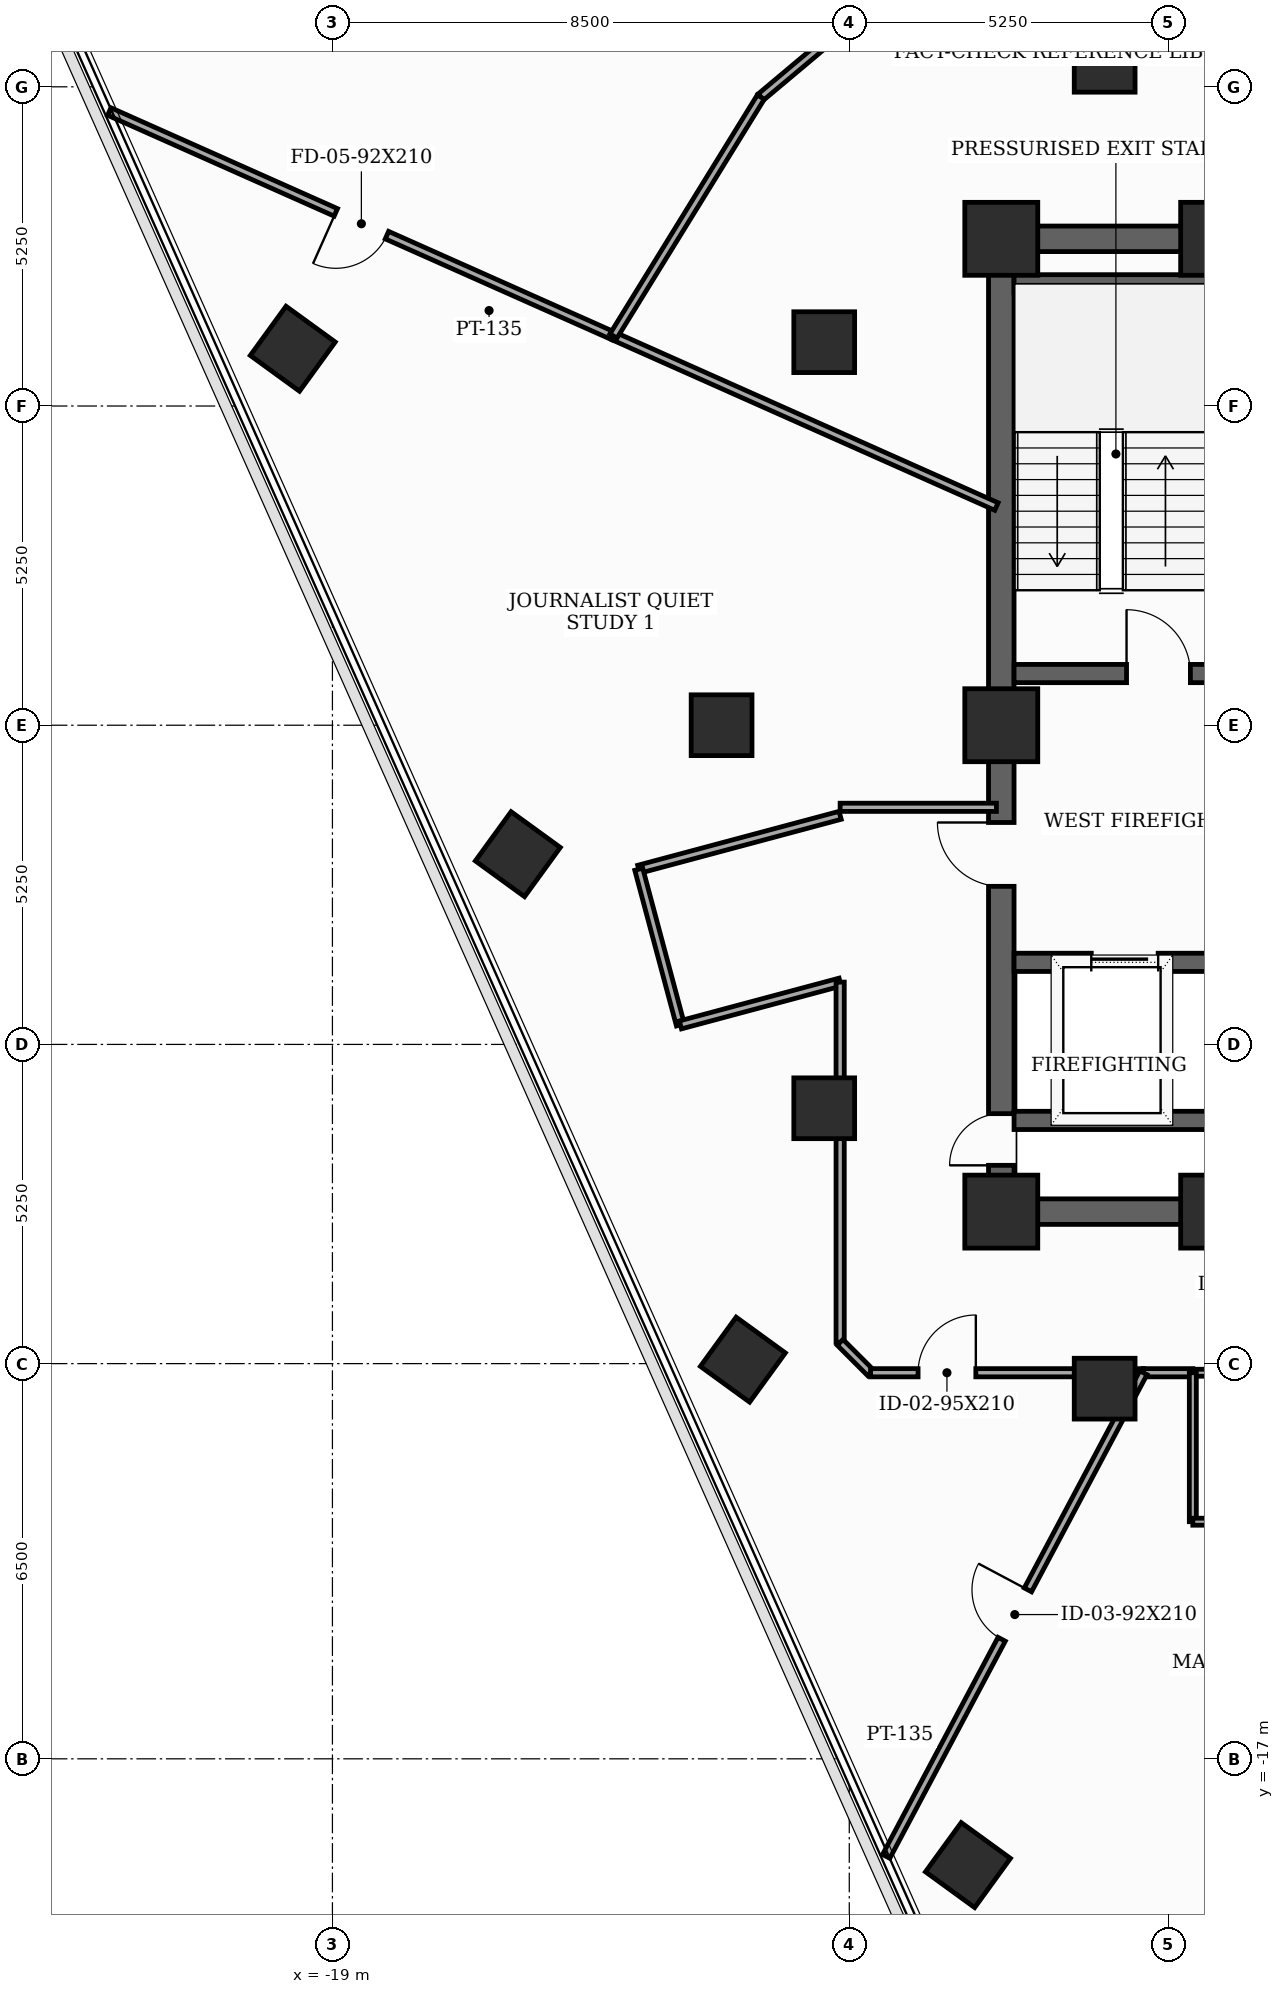
"""IFC4 building model, lengths in metres.
Left out: names, types, materials, properties, quantities, classifications, styles, units other than length and angle.
Written with IfcOpenShell. Run it as: python <this file> out.ifc"""

import sys

from ifc_helpers import new_model, si_unit, direction, frame, frame_2d, origin, origin_2d, place, context, subcontext, project, spatial, rectangle, extrude, element, fill, save


model = new_model("IFC4")
c1 = context("Model", 3, precision=1e-05, world=origin(), true_north=direction((0.0, 1.0)))
c2 = subcontext(c1, "Body", "Model", "MODEL_VIEW")
j1 = project(units=[si_unit("LENGTHUNIT", "METRE"), si_unit("PLANEANGLEUNIT", "RADIAN")], contexts=[c1])
p1 = place(None, origin())
s1 = spatial("IfcSite", under=j1, at=p1, CompositionType="ELEMENT")
p2 = place(p1, origin())
s2 = spatial("IfcBuilding", under=s1, at=p2, CompositionType="ELEMENT")
p3 = place(p2, frame((0.0, 0.0, 237.4)))
s3 = spatial("IfcBuildingStorey", under=s2, at=p3, CompositionType="ELEMENT", Elevation=237.4)
for number, where, z_axis, x_axis in (
    (1, (-8.0, -8.0, 0.0), (0.0, 0.0, 1.0), (1.0, 0.0, 0.0)),
    (2, (-4.45, -8.0, 0.0), (0.0, 0.0, 1.0), (1.0, 0.0, 0.0)),
    (3, (-4.45, 8.0, 0.0), (0.0, 0.0, 1.0), (1.0, 0.0, 0.0)),
    (4, (-8.0, 8.0, 0.0), (0.0, 0.0, 1.0), (1.0, 0.0, 0.0)),
    (5, (-8.0, 0.0, 0.0), (0.0, 0.0, 1.0), (1.0, 0.0, 0.0)),
):
    element("IfcColumn", number, at=place(p3, frame(where, z_axis=z_axis, x_axis=x_axis)), inside=s3, PredefinedType="COLUMN", context=c2, shape_type="SweptSolid", body=[
        extrude(rectangle(XDim=1.2, YDim=1.2, at=origin_2d()), origin(), (0.0, 0.0, 1.0), 3.7),
    ])
for number, where, z_axis, x_axis in (
    (6, (-6.3, 10.912, 0.0), (0.0, 0.0, 1.0), (1.0, 0.0, 0.0)),
    (7, (-10.912, 6.3, 0.0), (0.0, 0.0, 1.0), (1.0, 0.0, 0.0)),
    (8, (-12.6, 0.0, 0.0), (0.0, 0.0, 1.0), (1.0, 0.0, 0.0)),
    (9, (-10.912, -6.3, 0.0), (0.0, 0.0, 1.0), (1.0, 0.0, 0.0)),
    (10, (-6.3, -10.912, 0.0), (0.0, 0.0, 1.0), (1.0, 0.0, 0.0)),
    (11, (-19.652, 6.192, 0.0), (0.0, 0.0, 1.0), (0.588, 0.809, 0.0)),
    (12, (-15.951, -2.121, 0.0), (0.0, 0.0, 1.0), (0.588, 0.809, 0.0)),
    (13, (-12.25, -10.435, 0.0), (0.0, 0.0, 1.0), (0.588, 0.809, 0.0)),
    (14, (-8.548, -18.748, 0.0), (0.0, 0.0, 1.0), (0.588, 0.809, 0.0)),
):
    element("IfcColumn", number, at=place(p3, frame(where, z_axis=z_axis, x_axis=x_axis)), inside=s3, PredefinedType="COLUMN", context=c2, shape_type="SweptSolid", body=[
        extrude(rectangle(XDim=1.0, YDim=1.0, at=origin_2d()), origin(), (0.0, 0.0, 1.0), 3.7),
    ])
p4 = place(p3, frame((-8.0, -8.0, 0.0), z_axis=(0.0, 0.0, 1.0), x_axis=(0.0, 1.0, 0.0)))
e15 = element("IfcWall", 15, at=p4, inside=s3, PredefinedType="SHEAR", context=c2, shape_type="SweptSolid", body=[
    extrude(rectangle(XDim=16.0, YDim=0.42, at=frame_2d((8.0, 0.0))), origin(), (0.0, 0.0, 1.0), 3.5),
])
p5 = place(p4, frame((0.761, 0.0, 0.0)))
e16 = element("IfcOpeningElement", 16, at=p5, cuts=e15, PredefinedType="OPENING", context=c2, shape_type="SweptSolid", body=[
    extrude(rectangle(XDim=0.85, YDim=2.02, at=frame_2d((0.425, 1.01))), frame((0.0, 0.22, 0.0), z_axis=(0.0, -1.0, 0.0), x_axis=(1.0, 0.0, 0.0)), (0.0, 0.0, 1.0), 0.44),
])
p6 = place(p4, frame((5.35, 0.0, 0.0)))
e17 = element("IfcOpeningElement", 17, at=p6, cuts=e15, PredefinedType="OPENING", context=c2, shape_type="SweptSolid", body=[
    extrude(rectangle(XDim=1.05, YDim=2.15, at=frame_2d((0.525, 1.075))), frame((0.0, 0.22, 0.0), z_axis=(0.0, -1.0, 0.0), x_axis=(1.0, 0.0, 0.0)), (0.0, 0.0, 1.0), 0.44),
])
p7 = place(p3, frame((-8.0, -8.0, 0.0), z_axis=(0.0, 0.0, 1.0), x_axis=(1.0, 0.0, 0.0)))
e18 = element("IfcWall", 18, at=p7, inside=s3, PredefinedType="SHEAR", context=c2, shape_type="SweptSolid", body=[
    extrude(rectangle(XDim=16.0, YDim=0.42, at=frame_2d((8.0, 0.0))), origin(), (0.0, 0.0, 1.0), 3.5),
])
p8 = place(p7, frame((4.6, 0.0, 0.0)))
e19 = element("IfcOpeningElement", 19, at=p8, cuts=e18, PredefinedType="OPENING", context=c2, shape_type="SweptSolid", body=[
    extrude(rectangle(XDim=0.95, YDim=2.1, at=frame_2d((0.475, 1.05))), frame((0.0, 0.22, 0.0), z_axis=(0.0, -1.0, 0.0), x_axis=(1.0, 0.0, 0.0)), (0.0, 0.0, 1.0), 0.44),
])
p9 = place(p7, frame((7.52, 0.0, 0.0)))
e20 = element("IfcOpeningElement", 20, at=p9, cuts=e18, PredefinedType="OPENING", context=c2, shape_type="SweptSolid", body=[
    extrude(rectangle(XDim=0.95, YDim=2.1, at=frame_2d((0.475, 1.05))), frame((0.0, 0.22, 0.0), z_axis=(0.0, -1.0, 0.0), x_axis=(1.0, 0.0, 0.0)), (0.0, 0.0, 1.0), 0.44),
])
p10 = place(p7, frame((10.45, 0.0, 0.0)))
e21 = element("IfcOpeningElement", 21, at=p10, cuts=e18, PredefinedType="OPENING", context=c2, shape_type="SweptSolid", body=[
    extrude(rectangle(XDim=0.95, YDim=2.1, at=frame_2d((0.475, 1.05))), frame((0.0, 0.22, 0.0), z_axis=(0.0, -1.0, 0.0), x_axis=(1.0, 0.0, 0.0)), (0.0, 0.0, 1.0), 0.44),
])
p11 = place(p3, frame((-8.0, 8.0, 0.0), z_axis=(0.0, 0.0, 1.0), x_axis=(1.0, 0.0, 0.0)))
e22 = element("IfcWall", 22, at=p11, inside=s3, PredefinedType="SHEAR", context=c2, shape_type="SweptSolid", body=[
    extrude(rectangle(XDim=16.0, YDim=0.42, at=frame_2d((8.0, 0.0))), origin(), (0.0, 0.0, 1.0), 3.5),
])
p12 = place(p11, frame((7.1, 0.0, 0.0)))
e23 = element("IfcOpeningElement", 23, at=p12, cuts=e22, PredefinedType="OPENING", context=c2, shape_type="SweptSolid", body=[
    extrude(rectangle(XDim=1.8, YDim=2.15, at=frame_2d((0.9, 1.075))), frame((0.0, 0.22, 0.0), z_axis=(0.0, -1.0, 0.0), x_axis=(1.0, 0.0, 0.0)), (0.0, 0.0, 1.0), 0.44),
])
p13 = place(p3, frame((-7.79, 0.85, 0.0), z_axis=(0.0, 0.0, 1.0), x_axis=(1.0, 0.0, 0.0)))
e24 = element("IfcWall", 24, at=p13, inside=s3, PredefinedType="SHEAR", context=c2, shape_type="SweptSolid", body=[
    extrude(rectangle(XDim=3.34, YDim=0.3, at=frame_2d((1.67, 0.0))), origin(), (0.0, 0.0, 1.0), 3.5),
])
p14 = place(p13, frame((1.85, 0.0, 0.0)))
e25 = element("IfcOpeningElement", 25, at=p14, cuts=e24, PredefinedType="OPENING", context=c2, shape_type="SweptSolid", body=[
    extrude(rectangle(XDim=1.05, YDim=2.15, at=frame_2d((0.525, 1.075))), frame((0.0, 0.16, 0.0), z_axis=(0.0, -1.0, 0.0), x_axis=(1.0, 0.0, 0.0)), (0.0, 0.0, 1.0), 0.32),
])
p15 = place(p3, frame((-7.79, 7.26, 0.0), z_axis=(0.0, 0.0, 1.0), x_axis=(1.0, 0.0, 0.0)))
e26 = element("IfcWall", 26, at=p15, inside=s3, PredefinedType="SHEAR", context=c2, shape_type="SweptSolid", body=[
    extrude(rectangle(XDim=3.34, YDim=0.3, at=frame_2d((1.67, 0.0))), origin(), (0.0, 0.0, 1.0), 3.5),
])
p16 = place(p3, frame((-7.79, -3.9, 0.0), z_axis=(0.0, 0.0, 1.0), x_axis=(1.0, 0.0, 0.0)))
e27 = element("IfcWall", 27, at=p16, inside=s3, PredefinedType="SHEAR", context=c2, shape_type="SweptSolid", body=[
    extrude(rectangle(XDim=3.34, YDim=0.3, at=frame_2d((1.67, 0.0))), origin(), (0.0, 0.0, 1.0), 3.5),
])
p17 = place(p16, frame((1.27, 0.0, 0.0)))
e28 = element("IfcOpeningElement", 28, at=p17, cuts=e27, PredefinedType="OPENING", context=c2, shape_type="SweptSolid", body=[
    extrude(rectangle(XDim=1.1, YDim=2.1, at=frame_2d((0.55, 1.05))), frame((0.0, 0.16, 0.0), z_axis=(0.0, -1.0, 0.0), x_axis=(1.0, 0.0, 0.0)), (0.0, 0.0, 1.0), 0.32),
])
p18 = place(p3, frame((-7.79, -6.5, 0.0), z_axis=(0.0, 0.0, 1.0), x_axis=(1.0, 0.0, 0.0)))
e29 = element("IfcWall", 29, at=p18, inside=s3, PredefinedType="SHEAR", context=c2, shape_type="SweptSolid", body=[
    extrude(rectangle(XDim=3.34, YDim=0.3, at=frame_2d((1.67, 0.0))), origin(), (0.0, 0.0, 1.0), 3.5),
])
p19 = place(p3, frame((-8.08, -1.35, 0.0), z_axis=(0.0, 0.0, 1.0), x_axis=(-1.0, 0.0, 0.0)))
e30 = element("IfcWall", 30, at=p19, inside=s3, PredefinedType="PARTITIONING", context=c2, shape_type="SweptSolid", body=[
    extrude(rectangle(XDim=2.57, YDim=0.135, at=frame_2d((1.285, 0.0))), origin(), (0.0, 0.0, 1.0), 2.885),
])
p20 = place(p3, frame((-10.65, -1.482, 0.0), z_axis=(0.0, 0.0, 1.0), x_axis=(-0.965961397105, -0.2586862565, 0.0)))
e31 = element("IfcWall", 31, at=p20, inside=s3, PredefinedType="PARTITIONING", context=c2, shape_type="SweptSolid", body=[
    extrude(rectangle(XDim=3.429, YDim=0.135, at=frame_2d((1.714, 0.0))), origin(), (0.0, 0.0, 1.0), 2.885),
])
p21 = place(p3, frame((-13.962, -2.369, 0.0), z_axis=(0.0, 0.0, 1.0), x_axis=(0.258413725385, -0.966034340245, 0.0)))
e32 = element("IfcWall", 32, at=p21, inside=s3, PredefinedType="PARTITIONING", context=c2, shape_type="SweptSolid", body=[
    extrude(rectangle(XDim=2.65, YDim=0.135, at=frame_2d((1.325, 0.0))), origin(), (0.0, 0.0, 1.0), 3.5),
])
p22 = place(p3, frame((-13.277, -4.929, 0.0), z_axis=(0.0, 0.0, 1.0), x_axis=(0.965934830229, 0.258785439601, 0.0)))
e33 = element("IfcWall", 33, at=p22, inside=s3, PredefinedType="PARTITIONING", context=c2, shape_type="SweptSolid", body=[
    extrude(rectangle(XDim=2.72, YDim=0.135, at=frame_2d((1.36, 0.0))), origin(), (0.0, 0.0, 1.0), 2.885),
])
p23 = place(p3, frame((-10.65, -4.225, 0.0), z_axis=(0.0, 0.0, 1.0), x_axis=(0.0, -1.0, 0.0)))
e34 = element("IfcWall", 34, at=p23, inside=s3, PredefinedType="PARTITIONING", context=c2, shape_type="SweptSolid", body=[
    extrude(rectangle(XDim=5.925, YDim=0.135, at=frame_2d((2.962, 0.0))), origin(), (0.0, 0.0, 1.0), 2.885),
])
p24 = place(p3, frame((-10.65, -10.15, 0.0), z_axis=(0.0, 0.0, 1.0), x_axis=(0.707106781187, -0.707106781187, 0.0)))
e35 = element("IfcWall", 35, at=p24, inside=s3, PredefinedType="PARTITIONING", context=c2, shape_type="SweptSolid", body=[
    extrude(rectangle(XDim=0.707, YDim=0.135, at=frame_2d((0.354, 0.0))), origin(), (0.0, 0.0, 1.0), 3.5),
])
p25 = place(p3, frame((-10.15, -10.65, 0.0), z_axis=(0.0, 0.0, 1.0), x_axis=(1.0, 0.0, 0.0)))
e36 = element("IfcWall", 36, at=p25, inside=s3, PredefinedType="PARTITIONING", context=c2, shape_type="SweptSolid", body=[
    extrude(rectangle(XDim=4.487, YDim=0.135, at=frame_2d((2.243, 0.0))), origin(), (0.0, 0.0, 1.0), 2.885),
])
p26 = place(p25, frame((0.781, 0.0, 0.0)))
e37 = element("IfcOpeningElement", 37, at=p26, cuts=e36, PredefinedType="OPENING", context=c2, shape_type="SweptSolid", body=[
    extrude(rectangle(XDim=0.95, YDim=2.1, at=frame_2d((0.475, 1.05))), frame((0.0, 0.077, 0.0), z_axis=(0.0, -1.0, 0.0), x_axis=(1.0, 0.0, 0.0)), (0.0, 0.0, 1.0), 0.155),
])
p27 = place(p3, frame((-4.85, -10.65, 0.0), z_axis=(0.0, 0.0, 1.0), x_axis=(1.0, 0.0, 0.0)))
e38 = element("IfcWall", 38, at=p27, inside=s3, PredefinedType="PARTITIONING", context=c2, shape_type="SweptSolid", body=[
    extrude(rectangle(XDim=2.4, YDim=0.115, at=frame_2d((1.2, 0.0))), origin(), (0.0, 0.0, 1.0), 3.5),
])
p28 = place(p27, frame((0.74, 0.0, 0.0)))
e39 = element("IfcOpeningElement", 39, at=p28, cuts=e38, PredefinedType="OPENING", context=c2, shape_type="SweptSolid", body=[
    extrude(rectangle(XDim=0.92, YDim=2.1, at=frame_2d((0.46, 1.05))), frame((0.0, 0.067, 0.0), z_axis=(0.0, -1.0, 0.0), x_axis=(1.0, 0.0, 0.0)), (0.0, 0.0, 1.0), 0.135),
])
p29 = place(p3, frame((-5.663, -10.65, 0.0), z_axis=(0.0, 0.0, 1.0), x_axis=(1.0, 0.0, 0.0)))
e40 = element("IfcWall", 40, at=p29, inside=s3, PredefinedType="PARTITIONING", context=c2, shape_type="SweptSolid", body=[
    extrude(rectangle(XDim=0.813, YDim=0.135, at=frame_2d((0.406, 0.0))), origin(), (0.0, 0.0, 1.0), 3.5),
])
p30 = place(p3, frame((-9.893, -18.605, 0.0), z_axis=(0.0, 0.0, 1.0), x_axis=(0.469478145305, 0.88294409284, 0.0)))
e41 = element("IfcWall", 41, at=p30, inside=s3, PredefinedType="PARTITIONING", context=c2, shape_type="SweptSolid", body=[
    extrude(rectangle(XDim=9.01, YDim=0.135, at=frame_2d((4.505, 0.0))), origin(), (0.0, 0.0, 1.0), 2.885),
])
p31 = place(p30, frame((4.045, 0.0, 0.0)))
e42 = element("IfcOpeningElement", 42, at=p31, cuts=e41, PredefinedType="OPENING", context=c2, shape_type="SweptSolid", body=[
    extrude(rectangle(XDim=0.92, YDim=2.1, at=frame_2d((0.46, 1.05))), frame((0.0, 0.077, 0.0), z_axis=(0.0, -1.0, 0.0), x_axis=(1.0, 0.0, 0.0)), (0.0, 0.0, 1.0), 0.155),
])
p32 = place(p3, frame((-8.08, 3.597, 0.0), z_axis=(0.0, 0.0, 1.0), x_axis=(-0.913494385598, 0.40685133339, 0.0)))
e43 = element("IfcWall", 43, at=p32, inside=s3, PredefinedType="PARTITIONING", context=c2, shape_type="SweptSolid", body=[
    extrude(rectangle(XDim=6.894, YDim=0.135, at=frame_2d((3.447, 0.0))), origin(), (0.0, 0.0, 1.0), 2.885),
])
p33 = place(p3, frame((-14.378, 6.402, 0.0), z_axis=(0.0, 0.0, 1.0), x_axis=(-0.913562917951, 0.406697424315, 0.0)))
e44 = element("IfcWall", 44, at=p33, inside=s3, PredefinedType="PARTITIONING", context=c2, shape_type="SweptSolid", body=[
    extrude(rectangle(XDim=9.077, YDim=0.135, at=frame_2d((4.538, 0.0))), origin(), (0.0, 0.0, 1.0), 2.985),
])
p34 = place(p33, frame((4.078, 0.0, 0.0)))
e45 = element("IfcOpeningElement", 45, at=p34, cuts=e44, PredefinedType="OPENING", context=c2, shape_type="SweptSolid", body=[
    extrude(rectangle(XDim=0.92, YDim=2.1, at=frame_2d((0.46, 1.05))), frame((0.0, 0.077, 0.0), z_axis=(0.0, -1.0, 0.0), x_axis=(1.0, 0.0, 0.0)), (0.0, 0.0, 1.0), 0.155),
])
p35 = place(p3, frame((-4.85, -10.65, 0.0), z_axis=(0.0, 0.0, 1.0), x_axis=(0.0, -1.0, 0.0)))
e46 = element("IfcWall", 46, at=p35, inside=s3, PredefinedType="PARTITIONING", context=c2, shape_type="SweptSolid", body=[
    extrude(rectangle(XDim=2.45, YDim=0.115, at=frame_2d((1.225, 0.0))), origin(), (0.0, 0.0, 1.0), 2.885),
])
p36 = place(p3, frame((-4.85, -13.1, 0.0), z_axis=(0.0, 0.0, 1.0), x_axis=(1.0, 0.0, 0.0)))
e47 = element("IfcWall", 47, at=p36, inside=s3, PredefinedType="PARTITIONING", context=c2, shape_type="SweptSolid", body=[
    extrude(rectangle(XDim=2.4, YDim=0.115, at=frame_2d((1.2, 0.0))), origin(), (0.0, 0.0, 1.0), 3.5),
])
p37 = place(p3, frame((-8.098, 13.567, 0.0), z_axis=(0.0, 0.0, 1.0), x_axis=(-0.766114520239, -0.642704085781, 0.0)))
e48 = element("IfcWall", 48, at=p37, inside=s3, PredefinedType="PARTITIONING", context=c2, shape_type="SweptSolid", body=[
    extrude(rectangle(XDim=5.035, YDim=0.135, at=frame_2d((2.517, 0.0))), origin(), (0.0, 0.0, 1.0), 2.985),
])
p38 = place(p3, frame((-11.955, 10.331, 0.0), z_axis=(0.0, 0.0, 1.0), x_axis=(-0.524888064347, -0.851171263557, 0.0)))
e49 = element("IfcWall", 49, at=p38, inside=s3, PredefinedType="PARTITIONING", context=c2, shape_type="SweptSolid", body=[
    extrude(rectangle(XDim=4.616, YDim=0.135, at=frame_2d((2.308, 0.0))), origin(), (0.0, 0.0, 1.0), 2.985),
])
p39 = place(p5, origin())
e50 = element("IfcDoor", 50, at=p39, inside=s3, OperationType="SINGLE_SWING_LEFT", PredefinedType="TRAPDOOR", context=c2, shape_type="SweptSolid", body=[
    extrude(rectangle(XDim=0.85, YDim=2.02, at=frame_2d((0.425, 1.01))), frame((0.0, 0.025, 0.0), z_axis=(0.0, -1.0, 0.0), x_axis=(1.0, 0.0, 0.0)), (0.0, 0.0, 1.0), 0.05),
])
fill(e16, e50)
p40 = place(p6, origin())
e51 = element("IfcDoor", 51, at=p40, inside=s3, OperationType="SINGLE_SWING_RIGHT", PredefinedType="DOOR", context=c2, shape_type="SweptSolid", body=[
    extrude(rectangle(XDim=1.05, YDim=2.15, at=frame_2d((0.525, 1.075))), frame((0.0, 0.025, 0.0), z_axis=(0.0, -1.0, 0.0), x_axis=(1.0, 0.0, 0.0)), (0.0, 0.0, 1.0), 0.05),
])
fill(e17, e51)
p41 = place(p14, origin())
e52 = element("IfcDoor", 52, at=p41, inside=s3, OperationType="SINGLE_SWING_LEFT", PredefinedType="DOOR", context=c2, shape_type="SweptSolid", body=[
    extrude(rectangle(XDim=1.05, YDim=2.15, at=frame_2d((0.525, 1.075))), frame((0.0, 0.025, 0.0), z_axis=(0.0, -1.0, 0.0), x_axis=(1.0, 0.0, 0.0)), (0.0, 0.0, 1.0), 0.05),
])
fill(e25, e52)
p42 = place(p17, origin())
e53 = element("IfcDoor", 53, at=p42, inside=s3, OperationType="SLIDING_TO_LEFT", PredefinedType="DOOR", context=c2, shape_type="SweptSolid", body=[
    extrude(rectangle(XDim=1.1, YDim=2.1, at=frame_2d((0.55, 1.05))), frame((0.0, 0.025, 0.0), z_axis=(0.0, -1.0, 0.0), x_axis=(1.0, 0.0, 0.0)), (0.0, 0.0, 1.0), 0.05),
])
fill(e28, e53)
p43 = place(p26, origin())
e54 = element("IfcDoor", 54, at=p43, inside=s3, OperationType="SINGLE_SWING_RIGHT", PredefinedType="DOOR", context=c2, shape_type="SweptSolid", body=[
    extrude(rectangle(XDim=0.95, YDim=2.1, at=frame_2d((0.475, 1.05))), frame((0.0, 0.025, 0.0), z_axis=(0.0, -1.0, 0.0), x_axis=(1.0, 0.0, 0.0)), (0.0, 0.0, 1.0), 0.05),
])
fill(e37, e54)
p44 = place(p31, origin())
e55 = element("IfcDoor", 55, at=p44, inside=s3, OperationType="SINGLE_SWING_RIGHT", PredefinedType="DOOR", context=c2, shape_type="SweptSolid", body=[
    extrude(rectangle(XDim=0.92, YDim=2.1, at=frame_2d((0.46, 1.05))), frame((0.0, 0.025, 0.0), z_axis=(0.0, -1.0, 0.0), x_axis=(1.0, 0.0, 0.0)), (0.0, 0.0, 1.0), 0.05),
])
fill(e42, e55)
p45 = place(p34, origin())
e56 = element("IfcDoor", 56, at=p45, inside=s3, OperationType="SINGLE_SWING_RIGHT", PredefinedType="DOOR", context=c2, shape_type="SweptSolid", body=[
    extrude(rectangle(XDim=0.92, YDim=2.1, at=frame_2d((0.46, 1.05))), frame((0.0, 0.025, 0.0), z_axis=(0.0, -1.0, 0.0), x_axis=(1.0, 0.0, 0.0)), (0.0, 0.0, 1.0), 0.05),
])
fill(e45, e56)
save(model, sys.argv[1])
